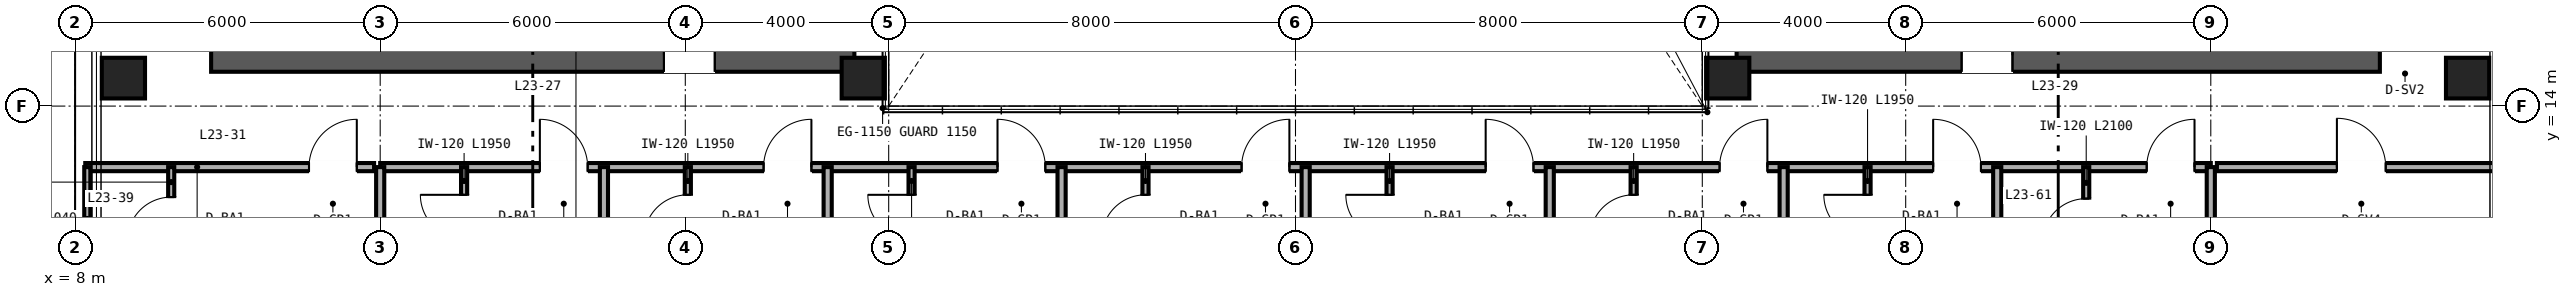
"""IFC4 building model, lengths in metres.
Left out: names, types, materials, properties, quantities, classifications, styles, units other than length and angle.
Written with IfcOpenShell. Run it as: python <this file> out.ifc"""

import sys

from ifc_helpers import new_model, si_unit, direction, frame, frame_2d, origin, origin_2d, place, context, subcontext, project, spatial, rectangle, hollow_rectangle, extrude, source, transform, mapped, element, fill, save


model = new_model("IFC4")
c1 = context("Model", 3, precision=1e-05, world=origin(), true_north=direction((0.0, 1.0)))
c2 = subcontext(c1, "Body", "Model", "MODEL_VIEW")
j1 = project(units=[si_unit("LENGTHUNIT", "METRE"), si_unit("PLANEANGLEUNIT", "RADIAN")], contexts=[c1])
p1 = place(None, origin())
s1 = spatial("IfcSite", under=j1, at=p1, CompositionType="ELEMENT")
p2 = place(p1, origin())
s2 = spatial("IfcBuilding", under=s1, at=p2, CompositionType="ELEMENT")
p3 = place(p2, frame((0.0, 0.0, 97.2)))
s3 = spatial("IfcBuildingStorey", under=s2, at=p3, CompositionType="ELEMENT", Elevation=97.2)
p4 = place(p3, frame((10.675, 15.0, 0.0), z_axis=(0.0, 0.0, 1.0), x_axis=(1.0, 0.0, 0.0)))
e1 = element("IfcWall", 1, at=p4, inside=s3, PredefinedType="SHEAR", context=c2, shape_type="SweptSolid", body=[
    extrude(rectangle(XDim=12.65, YDim=0.65, at=frame_2d((6.325, 0.0))), origin(), (0.0, 0.0, 1.0), 3.36),
])
p5 = place(p4, frame((8.905, 0.0, 0.0)))
e2 = element("IfcOpeningElement", 2, at=p5, cuts=e1, PredefinedType="OPENING", context=c2, shape_type="SweptSolid", body=[
    extrude(rectangle(XDim=1.0, YDim=2.15, at=frame_2d((0.5, 1.075))), frame((0.0, 0.335, 0.0), z_axis=(0.0, -1.0, 0.0), x_axis=(1.0, 0.0, 0.0)), (0.0, 0.0, 1.0), 0.67),
])
p6 = place(p3, frame((40.675, 15.0, 0.0), z_axis=(0.0, 0.0, 1.0), x_axis=(1.0, 0.0, 0.0)))
e3 = element("IfcWall", 3, at=p6, inside=s3, PredefinedType="SHEAR", context=c2, shape_type="SweptSolid", body=[
    extrude(rectangle(XDim=12.65, YDim=0.65, at=frame_2d((6.325, 0.0))), origin(), (0.0, 0.0, 1.0), 3.36),
])
p7 = place(p6, frame((4.425, 0.0, 0.0)))
e4 = element("IfcOpeningElement", 4, at=p7, cuts=e3, PredefinedType="OPENING", context=c2, shape_type="SweptSolid", body=[
    extrude(rectangle(XDim=1.0, YDim=2.15, at=frame_2d((0.5, 1.075))), frame((0.0, 0.335, 0.0), z_axis=(0.0, -1.0, 0.0), x_axis=(1.0, 0.0, 0.0)), (0.0, 0.0, 1.0), 0.67),
])
m1 = source(origin(), c2, "Body", "SweptSolid", [
    extrude(hollow_rectangle(XDim=0.85, YDim=0.8, WallThickness=0.032, at=origin_2d()), origin(), (0.0, 0.0, 1.0), 3.36),
])
for number, where, z_axis, x_axis in (
    (5, (8.95, 14.55, 0.0), (0.0, 0.0, 1.0), (1.0, 0.0, 0.0)),
    (6, (23.5, 14.55, 0.0), (0.0, 0.0, 1.0), (1.0, 0.0, 0.0)),
    (7, (40.5, 14.55, 0.0), (0.0, 0.0, 1.0), (1.0, 0.0, 0.0)),
    (8, (55.05, 14.55, 0.0), (0.0, 0.0, 1.0), (1.0, 0.0, 0.0)),
):
    element("IfcColumn", number, at=place(p3, frame(where, z_axis=z_axis, x_axis=x_axis)), inside=s3, PredefinedType="COLUMN", context=c2, shape_type="MappedRepresentation", body=[
        mapped(m1, transform((0.0, 0.0, 0.0), scale=1.0)),
    ])
p8 = place(p3, frame((8.2, 12.8, 0.0), z_axis=(0.0, 0.0, 1.0), x_axis=(1.0, 0.0, 0.0)))
e9 = element("IfcWall", 9, at=p8, inside=s3, PredefinedType="PARTITIONING", context=c2, shape_type="SweptSolid", body=[
    extrude(rectangle(XDim=5.68, YDim=0.16, at=frame_2d((2.84, 0.0))), origin(), (0.0, 0.0, 1.0), 3.36),
])
p9 = place(p8, frame((4.4, 0.0, 0.0)))
e10 = element("IfcOpeningElement", 10, at=p9, cuts=e9, PredefinedType="OPENING", context=c2, shape_type="SweptSolid", body=[
    extrude(rectangle(XDim=0.94, YDim=2.15, at=frame_2d((0.47, 1.075))), frame((0.0, 0.09, 0.0), z_axis=(0.0, -1.0, 0.0), x_axis=(1.0, 0.0, 0.0)), (0.0, 0.0, 1.0), 0.18),
])
p10 = place(p3, frame((9.89, 10.76, 0.0), z_axis=(0.0, 0.0, 1.0), x_axis=(0.0, 1.0, 0.0)))
e11 = element("IfcWall", 11, at=p10, inside=s3, PredefinedType="PARTITIONING", context=c2, shape_type="SweptSolid", body=[
    extrude(rectangle(XDim=2.04, YDim=0.12, at=frame_2d((1.02, 0.0))), origin(), (0.0, 0.0, 1.0), 3.36),
])
p11 = place(p10, frame((0.59, 0.0, 0.0)))
e12 = element("IfcOpeningElement", 12, at=p11, cuts=e11, PredefinedType="OPENING", context=c2, shape_type="SweptSolid", body=[
    extrude(rectangle(XDim=0.86, YDim=2.1, at=frame_2d((0.43, 1.05))), frame((0.0, 0.07, 0.0), z_axis=(0.0, -1.0, 0.0), x_axis=(1.0, 0.0, 0.0)), (0.0, 0.0, 1.0), 0.14),
])
p12 = place(p3, frame((8.24, 10.76, 0.0), z_axis=(0.0, 0.0, 1.0), x_axis=(0.0, 1.0, 0.0)))
e13 = element("IfcWall", 13, at=p12, inside=s3, PredefinedType="PARTITIONING", context=c2, shape_type="SweptSolid", body=[
    extrude(rectangle(XDim=2.04, YDim=0.12, at=frame_2d((1.02, 0.0))), origin(), (0.0, 0.0, 1.0), 3.36),
])
p13 = place(p3, frame((50.12, 12.8, 0.0), z_axis=(0.0, 0.0, 1.0), x_axis=(1.0, 0.0, 0.0)))
e14 = element("IfcWall", 14, at=p13, inside=s3, PredefinedType="PARTITIONING", context=c2, shape_type="SweptSolid", body=[
    extrude(rectangle(XDim=5.68, YDim=0.16, at=frame_2d((2.84, 0.0))), origin(), (0.0, 0.0, 1.0), 3.36),
])
p14 = place(p13, frame((2.36, 0.0, 0.0)))
e15 = element("IfcOpeningElement", 15, at=p14, cuts=e14, PredefinedType="OPENING", context=c2, shape_type="SweptSolid", body=[
    extrude(rectangle(XDim=0.96, YDim=2.15, at=frame_2d((0.48, 1.075))), frame((0.0, 0.09, 0.0), z_axis=(0.0, -1.0, 0.0), x_axis=(1.0, 0.0, 0.0)), (0.0, 0.0, 1.0), 0.18),
])
p15 = place(p3, frame((14.0, 12.8, 0.0), z_axis=(0.0, 0.0, 1.0), x_axis=(1.0, 0.0, 0.0)))
e16 = element("IfcWall", 16, at=p15, inside=s3, PredefinedType="PARTITIONING", context=c2, shape_type="SweptSolid", body=[
    extrude(rectangle(XDim=36.0, YDim=0.16, at=frame_2d((18.0, 0.0))), origin(), (0.0, 0.0, 1.0), 2.581),
])
p16 = place(p15, frame((3.14, 0.0, 0.0)))
e17 = element("IfcOpeningElement", 17, at=p16, cuts=e16, PredefinedType="OPENING", context=c2, shape_type="SweptSolid", body=[
    extrude(rectangle(XDim=0.94, YDim=2.15, at=frame_2d((0.47, 1.075))), frame((0.0, 0.09, 0.0), z_axis=(0.0, -1.0, 0.0), x_axis=(1.0, 0.0, 0.0)), (0.0, 0.0, 1.0), 0.18),
])
p17 = place(p15, frame((7.54, 0.0, 0.0)))
e18 = element("IfcOpeningElement", 18, at=p17, cuts=e16, PredefinedType="OPENING", context=c2, shape_type="SweptSolid", body=[
    extrude(rectangle(XDim=0.94, YDim=2.15, at=frame_2d((0.47, 1.075))), frame((0.0, 0.09, 0.0), z_axis=(0.0, -1.0, 0.0), x_axis=(1.0, 0.0, 0.0)), (0.0, 0.0, 1.0), 0.18),
])
p18 = place(p15, frame((12.14, 0.0, 0.0)))
e19 = element("IfcOpeningElement", 19, at=p18, cuts=e16, PredefinedType="OPENING", context=c2, shape_type="SweptSolid", body=[
    extrude(rectangle(XDim=0.94, YDim=2.15, at=frame_2d((0.47, 1.075))), frame((0.0, 0.09, 0.0), z_axis=(0.0, -1.0, 0.0), x_axis=(1.0, 0.0, 0.0)), (0.0, 0.0, 1.0), 0.18),
])
p19 = place(p15, frame((16.94, 0.0, 0.0)))
e20 = element("IfcOpeningElement", 20, at=p19, cuts=e16, PredefinedType="OPENING", context=c2, shape_type="SweptSolid", body=[
    extrude(rectangle(XDim=0.94, YDim=2.15, at=frame_2d((0.47, 1.075))), frame((0.0, 0.09, 0.0), z_axis=(0.0, -1.0, 0.0), x_axis=(1.0, 0.0, 0.0)), (0.0, 0.0, 1.0), 0.18),
])
p20 = place(p15, frame((21.74, 0.0, 0.0)))
e21 = element("IfcOpeningElement", 21, at=p20, cuts=e16, PredefinedType="OPENING", context=c2, shape_type="SweptSolid", body=[
    extrude(rectangle(XDim=0.94, YDim=2.15, at=frame_2d((0.47, 1.075))), frame((0.0, 0.09, 0.0), z_axis=(0.0, -1.0, 0.0), x_axis=(1.0, 0.0, 0.0)), (0.0, 0.0, 1.0), 0.18),
])
p21 = place(p15, frame((26.34, 0.0, 0.0)))
e22 = element("IfcOpeningElement", 22, at=p21, cuts=e16, PredefinedType="OPENING", context=c2, shape_type="SweptSolid", body=[
    extrude(rectangle(XDim=0.94, YDim=2.15, at=frame_2d((0.47, 1.075))), frame((0.0, 0.09, 0.0), z_axis=(0.0, -1.0, 0.0), x_axis=(1.0, 0.0, 0.0)), (0.0, 0.0, 1.0), 0.18),
])
p22 = place(p15, frame((30.54, 0.0, 0.0)))
e23 = element("IfcOpeningElement", 23, at=p22, cuts=e16, PredefinedType="OPENING", context=c2, shape_type="SweptSolid", body=[
    extrude(rectangle(XDim=0.94, YDim=2.15, at=frame_2d((0.47, 1.075))), frame((0.0, 0.09, 0.0), z_axis=(0.0, -1.0, 0.0), x_axis=(1.0, 0.0, 0.0)), (0.0, 0.0, 1.0), 0.18),
])
p23 = place(p15, frame((34.74, 0.0, 0.0)))
e24 = element("IfcOpeningElement", 24, at=p23, cuts=e16, PredefinedType="OPENING", context=c2, shape_type="SweptSolid", body=[
    extrude(rectangle(XDim=0.94, YDim=2.15, at=frame_2d((0.47, 1.075))), frame((0.0, 0.09, 0.0), z_axis=(0.0, -1.0, 0.0), x_axis=(1.0, 0.0, 0.0)), (0.0, 0.0, 1.0), 0.18),
])
for number, where, z_axis, x_axis in (
    (25, (14.0, 2.36, 0.0), (0.0, 0.0, 1.0), (0.0, 1.0, 0.0)),
    (26, (50.0, 2.36, 0.0), (0.0, 0.0, 1.0), (0.0, 1.0, 0.0)),
    (27, (18.4, 2.36, 0.0), (0.0, 0.0, 1.0), (0.0, 1.0, 0.0)),
):
    element("IfcWall", number, at=place(p3, frame(where, z_axis=z_axis, x_axis=x_axis)), inside=s3, PredefinedType="PARTITIONING", context=c2, shape_type="SweptSolid", body=[
        extrude(rectangle(XDim=10.44, YDim=0.16, at=frame_2d((5.22, 0.0))), origin(), (0.0, 0.0, 1.0), 2.667),
    ])
p24 = place(p3, frame((15.65, 10.85, 0.0), z_axis=(0.0, 0.0, 1.0), x_axis=(0.0, 1.0, 0.0)))
e28 = element("IfcWall", 28, at=p24, inside=s3, PredefinedType="PARTITIONING", context=c2, shape_type="SweptSolid", body=[
    extrude(rectangle(XDim=1.95, YDim=0.12, at=frame_2d((0.975, 0.0))), origin(), (0.0, 0.0, 1.0), 3.36),
])
p25 = place(p24, frame((0.545, 0.0, 0.0)))
e29 = element("IfcOpeningElement", 29, at=p25, cuts=e28, PredefinedType="OPENING", context=c2, shape_type="SweptSolid", body=[
    extrude(rectangle(XDim=0.86, YDim=2.1, at=frame_2d((0.43, 1.05))), frame((0.0, 0.07, 0.0), z_axis=(0.0, -1.0, 0.0), x_axis=(1.0, 0.0, 0.0)), (0.0, 0.0, 1.0), 0.14),
])
p26 = place(p3, frame((22.8, 2.36, 0.0), z_axis=(0.0, 0.0, 1.0), x_axis=(0.0, 1.0, 0.0)))
e30 = element("IfcWall", 30, at=p26, inside=s3, PredefinedType="PARTITIONING", context=c2, shape_type="SweptSolid", body=[
    extrude(rectangle(XDim=10.44, YDim=0.16, at=frame_2d((5.22, 0.0))), origin(), (0.0, 0.0, 1.0), 2.823),
])
p27 = place(p3, frame((20.05, 10.85, 0.0), z_axis=(0.0, 0.0, 1.0), x_axis=(0.0, 1.0, 0.0)))
e31 = element("IfcWall", 31, at=p27, inside=s3, PredefinedType="PARTITIONING", context=c2, shape_type="SweptSolid", body=[
    extrude(rectangle(XDim=1.95, YDim=0.12, at=frame_2d((0.975, 0.0))), origin(), (0.0, 0.0, 1.0), 3.36),
])
p28 = place(p27, frame((0.545, 0.0, 0.0)))
e32 = element("IfcOpeningElement", 32, at=p28, cuts=e31, PredefinedType="OPENING", context=c2, shape_type="SweptSolid", body=[
    extrude(rectangle(XDim=0.86, YDim=2.1, at=frame_2d((0.43, 1.05))), frame((0.0, 0.07, 0.0), z_axis=(0.0, -1.0, 0.0), x_axis=(1.0, 0.0, 0.0)), (0.0, 0.0, 1.0), 0.14),
])
p29 = place(p3, frame((27.4, 2.36, 0.0), z_axis=(0.0, 0.0, 1.0), x_axis=(0.0, 1.0, 0.0)))
e33 = element("IfcWall", 33, at=p29, inside=s3, PredefinedType="PARTITIONING", context=c2, shape_type="SweptSolid", body=[
    extrude(rectangle(XDim=10.44, YDim=0.16, at=frame_2d((5.22, 0.0))), origin(), (0.0, 0.0, 1.0), 2.433),
])
p30 = place(p3, frame((24.45, 10.85, 0.0), z_axis=(0.0, 0.0, 1.0), x_axis=(0.0, 1.0, 0.0)))
e34 = element("IfcWall", 34, at=p30, inside=s3, PredefinedType="PARTITIONING", context=c2, shape_type="SweptSolid", body=[
    extrude(rectangle(XDim=1.95, YDim=0.12, at=frame_2d((0.975, 0.0))), origin(), (0.0, 0.0, 1.0), 3.36),
])
p31 = place(p30, frame((0.545, 0.0, 0.0)))
e35 = element("IfcOpeningElement", 35, at=p31, cuts=e34, PredefinedType="OPENING", context=c2, shape_type="SweptSolid", body=[
    extrude(rectangle(XDim=0.86, YDim=2.1, at=frame_2d((0.43, 1.05))), frame((0.0, 0.07, 0.0), z_axis=(0.0, -1.0, 0.0), x_axis=(1.0, 0.0, 0.0)), (0.0, 0.0, 1.0), 0.14),
])
p32 = place(p3, frame((32.2, 2.36, 0.0), z_axis=(0.0, 0.0, 1.0), x_axis=(0.0, 1.0, 0.0)))
e36 = element("IfcWall", 36, at=p32, inside=s3, PredefinedType="PARTITIONING", context=c2, shape_type="SweptSolid", body=[
    extrude(rectangle(XDim=10.44, YDim=0.16, at=frame_2d((5.22, 0.0))), origin(), (0.0, 0.0, 1.0), 2.433),
])
p33 = place(p3, frame((29.05, 10.85, 0.0), z_axis=(0.0, 0.0, 1.0), x_axis=(0.0, 1.0, 0.0)))
e37 = element("IfcWall", 37, at=p33, inside=s3, PredefinedType="PARTITIONING", context=c2, shape_type="SweptSolid", body=[
    extrude(rectangle(XDim=1.95, YDim=0.12, at=frame_2d((0.975, 0.0))), origin(), (0.0, 0.0, 1.0), 3.36),
])
p34 = place(p33, frame((0.545, 0.0, 0.0)))
e38 = element("IfcOpeningElement", 38, at=p34, cuts=e37, PredefinedType="OPENING", context=c2, shape_type="SweptSolid", body=[
    extrude(rectangle(XDim=0.86, YDim=2.1, at=frame_2d((0.43, 1.05))), frame((0.0, 0.07, 0.0), z_axis=(0.0, -1.0, 0.0), x_axis=(1.0, 0.0, 0.0)), (0.0, 0.0, 1.0), 0.14),
])
p35 = place(p3, frame((37.0, 2.36, 0.0), z_axis=(0.0, 0.0, 1.0), x_axis=(0.0, 1.0, 0.0)))
e39 = element("IfcWall", 39, at=p35, inside=s3, PredefinedType="PARTITIONING", context=c2, shape_type="SweptSolid", body=[
    extrude(rectangle(XDim=10.44, YDim=0.16, at=frame_2d((5.22, 0.0))), origin(), (0.0, 0.0, 1.0), 2.433),
])
p36 = place(p3, frame((33.85, 10.85, 0.0), z_axis=(0.0, 0.0, 1.0), x_axis=(0.0, 1.0, 0.0)))
e40 = element("IfcWall", 40, at=p36, inside=s3, PredefinedType="PARTITIONING", context=c2, shape_type="SweptSolid", body=[
    extrude(rectangle(XDim=1.95, YDim=0.12, at=frame_2d((0.975, 0.0))), origin(), (0.0, 0.0, 1.0), 3.36),
])
p37 = place(p36, frame((0.545, 0.0, 0.0)))
e41 = element("IfcOpeningElement", 41, at=p37, cuts=e40, PredefinedType="OPENING", context=c2, shape_type="SweptSolid", body=[
    extrude(rectangle(XDim=0.86, YDim=2.1, at=frame_2d((0.43, 1.05))), frame((0.0, 0.07, 0.0), z_axis=(0.0, -1.0, 0.0), x_axis=(1.0, 0.0, 0.0)), (0.0, 0.0, 1.0), 0.14),
])
p38 = place(p3, frame((41.6, 2.36, 0.0), z_axis=(0.0, 0.0, 1.0), x_axis=(0.0, 1.0, 0.0)))
e42 = element("IfcWall", 42, at=p38, inside=s3, PredefinedType="PARTITIONING", context=c2, shape_type="SweptSolid", body=[
    extrude(rectangle(XDim=10.44, YDim=0.16, at=frame_2d((5.22, 0.0))), origin(), (0.0, 0.0, 1.0), 2.823),
])
p39 = place(p3, frame((38.65, 10.85, 0.0), z_axis=(0.0, 0.0, 1.0), x_axis=(0.0, 1.0, 0.0)))
e43 = element("IfcWall", 43, at=p39, inside=s3, PredefinedType="PARTITIONING", context=c2, shape_type="SweptSolid", body=[
    extrude(rectangle(XDim=1.95, YDim=0.12, at=frame_2d((0.975, 0.0))), origin(), (0.0, 0.0, 1.0), 3.36),
])
p40 = place(p39, frame((0.545, 0.0, 0.0)))
e44 = element("IfcOpeningElement", 44, at=p40, cuts=e43, PredefinedType="OPENING", context=c2, shape_type="SweptSolid", body=[
    extrude(rectangle(XDim=0.86, YDim=2.1, at=frame_2d((0.43, 1.05))), frame((0.0, 0.07, 0.0), z_axis=(0.0, -1.0, 0.0), x_axis=(1.0, 0.0, 0.0)), (0.0, 0.0, 1.0), 0.14),
])
p41 = place(p3, frame((45.8, 2.36, 0.0), z_axis=(0.0, 0.0, 1.0), x_axis=(0.0, 1.0, 0.0)))
e45 = element("IfcWall", 45, at=p41, inside=s3, PredefinedType="PARTITIONING", context=c2, shape_type="SweptSolid", body=[
    extrude(rectangle(XDim=10.44, YDim=0.16, at=frame_2d((5.22, 0.0))), origin(), (0.0, 0.0, 1.0), 2.667),
])
p42 = place(p3, frame((43.25, 10.85, 0.0), z_axis=(0.0, 0.0, 1.0), x_axis=(0.0, 1.0, 0.0)))
e46 = element("IfcWall", 46, at=p42, inside=s3, PredefinedType="PARTITIONING", context=c2, shape_type="SweptSolid", body=[
    extrude(rectangle(XDim=1.95, YDim=0.12, at=frame_2d((0.975, 0.0))), origin(), (0.0, 0.0, 1.0), 3.36),
])
p43 = place(p42, frame((0.545, 0.0, 0.0)))
e47 = element("IfcOpeningElement", 47, at=p43, cuts=e46, PredefinedType="OPENING", context=c2, shape_type="SweptSolid", body=[
    extrude(rectangle(XDim=0.86, YDim=2.1, at=frame_2d((0.43, 1.05))), frame((0.0, 0.07, 0.0), z_axis=(0.0, -1.0, 0.0), x_axis=(1.0, 0.0, 0.0)), (0.0, 0.0, 1.0), 0.14),
])
p44 = place(p3, frame((47.55, 10.7, 0.0), z_axis=(0.0, 0.0, 1.0), x_axis=(0.0, 1.0, 0.0)))
e48 = element("IfcWall", 48, at=p44, inside=s3, PredefinedType="PARTITIONING", context=c2, shape_type="SweptSolid", body=[
    extrude(rectangle(XDim=2.1, YDim=0.12, at=frame_2d((1.05, 0.0))), origin(), (0.0, 0.0, 1.0), 3.36),
])
p45 = place(p44, frame((0.62, 0.0, 0.0)))
e49 = element("IfcOpeningElement", 49, at=p45, cuts=e48, PredefinedType="OPENING", context=c2, shape_type="SweptSolid", body=[
    extrude(rectangle(XDim=0.86, YDim=2.1, at=frame_2d((0.43, 1.05))), frame((0.0, 0.07, 0.0), z_axis=(0.0, -1.0, 0.0), x_axis=(1.0, 0.0, 0.0)), (0.0, 0.0, 1.0), 0.14),
])
m2 = source(origin(), c2, "Body", "SweptSolid", [
    extrude(rectangle(XDim=1.0, YDim=2.15, at=frame_2d((0.5, 1.075))), frame((0.0, 0.025, 0.0), z_axis=(0.0, -1.0, 0.0), x_axis=(1.0, 0.0, 0.0)), (0.0, 0.0, 1.0), 0.05),
])
p46 = place(p5, origin())
e50 = element("IfcDoor", 50, at=p46, inside=s3, OperationType="SINGLE_SWING_LEFT", PredefinedType="DOOR", context=c2, shape_type="MappedRepresentation", body=[
    mapped(m2, transform((0.0, 0.0, 0.0), scale=1.0)),
])
fill(e2, e50)
p47 = place(p7, origin())
e51 = element("IfcDoor", 51, at=p47, inside=s3, OperationType="SINGLE_SWING_RIGHT", PredefinedType="DOOR", context=c2, shape_type="MappedRepresentation", body=[
    mapped(m2, transform((0.0, 0.0, 0.0), scale=1.0)),
])
fill(e4, e51)
m3 = source(origin(), c2, "Body", "SweptSolid", [
    extrude(rectangle(XDim=0.86, YDim=2.1, at=frame_2d((0.43, 1.05))), frame((0.0, 0.025, 0.0), z_axis=(0.0, -1.0, 0.0), x_axis=(1.0, 0.0, 0.0)), (0.0, 0.0, 1.0), 0.05),
])
p48 = place(p11, origin())
e52 = element("IfcDoor", 52, at=p48, inside=s3, OperationType="SINGLE_SWING_LEFT", PredefinedType="DOOR", context=c2, shape_type="MappedRepresentation", body=[
    mapped(m3, transform((0.0, 0.0, 0.0), scale=1.0)),
])
fill(e12, e52)
m4 = source(origin(), c2, "Body", "SweptSolid", [
    extrude(rectangle(XDim=0.94, YDim=2.15, at=frame_2d((0.47, 1.075))), frame((0.0, 0.025, 0.0), z_axis=(0.0, -1.0, 0.0), x_axis=(1.0, 0.0, 0.0)), (0.0, 0.0, 1.0), 0.05),
])
p49 = place(p9, origin())
e53 = element("IfcDoor", 53, at=p49, inside=s3, OperationType="SINGLE_SWING_RIGHT", PredefinedType="DOOR", context=c2, shape_type="MappedRepresentation", body=[
    mapped(m4, transform((0.0, 0.0, 0.0), scale=1.0)),
])
fill(e10, e53)
m5 = source(origin(), c2, "Body", "SweptSolid", [
    extrude(rectangle(XDim=0.96, YDim=2.15, at=frame_2d((0.48, 1.075))), frame((0.0, 0.025, 0.0), z_axis=(0.0, -1.0, 0.0), x_axis=(1.0, 0.0, 0.0)), (0.0, 0.0, 1.0), 0.05),
])
p50 = place(p14, origin())
e54 = element("IfcDoor", 54, at=p50, inside=s3, OperationType="SINGLE_SWING_LEFT", PredefinedType="DOOR", context=c2, shape_type="MappedRepresentation", body=[
    mapped(m5, transform((0.0, 0.0, 0.0), scale=1.0)),
])
fill(e15, e54)
p51 = place(p25, origin())
e55 = element("IfcDoor", 55, at=p51, inside=s3, OperationType="SINGLE_SWING_RIGHT", PredefinedType="DOOR", context=c2, shape_type="MappedRepresentation", body=[
    mapped(m3, transform((0.0, 0.0, 0.0), scale=1.0)),
])
fill(e29, e55)
p52 = place(p28, origin())
e56 = element("IfcDoor", 56, at=p52, inside=s3, OperationType="SINGLE_SWING_LEFT", PredefinedType="DOOR", context=c2, shape_type="MappedRepresentation", body=[
    mapped(m3, transform((0.0, 0.0, 0.0), scale=1.0)),
])
fill(e32, e56)
p53 = place(p31, origin())
e57 = element("IfcDoor", 57, at=p53, inside=s3, OperationType="SINGLE_SWING_RIGHT", PredefinedType="DOOR", context=c2, shape_type="MappedRepresentation", body=[
    mapped(m3, transform((0.0, 0.0, 0.0), scale=1.0)),
])
fill(e35, e57)
p54 = place(p34, origin())
e58 = element("IfcDoor", 58, at=p54, inside=s3, OperationType="SINGLE_SWING_LEFT", PredefinedType="DOOR", context=c2, shape_type="MappedRepresentation", body=[
    mapped(m3, transform((0.0, 0.0, 0.0), scale=1.0)),
])
fill(e38, e58)
p55 = place(p37, origin())
e59 = element("IfcDoor", 59, at=p55, inside=s3, OperationType="SINGLE_SWING_RIGHT", PredefinedType="DOOR", context=c2, shape_type="MappedRepresentation", body=[
    mapped(m3, transform((0.0, 0.0, 0.0), scale=1.0)),
])
fill(e41, e59)
p56 = place(p40, origin())
e60 = element("IfcDoor", 60, at=p56, inside=s3, OperationType="SINGLE_SWING_LEFT", PredefinedType="DOOR", context=c2, shape_type="MappedRepresentation", body=[
    mapped(m3, transform((0.0, 0.0, 0.0), scale=1.0)),
])
fill(e44, e60)
p57 = place(p43, origin())
e61 = element("IfcDoor", 61, at=p57, inside=s3, OperationType="SINGLE_SWING_RIGHT", PredefinedType="DOOR", context=c2, shape_type="MappedRepresentation", body=[
    mapped(m3, transform((0.0, 0.0, 0.0), scale=1.0)),
])
fill(e47, e61)
p58 = place(p45, origin())
e62 = element("IfcDoor", 62, at=p58, inside=s3, OperationType="SINGLE_SWING_LEFT", PredefinedType="DOOR", context=c2, shape_type="MappedRepresentation", body=[
    mapped(m3, transform((0.0, 0.0, 0.0), scale=1.0)),
])
fill(e49, e62)
p59 = place(p16, origin())
e63 = element("IfcDoor", 63, at=p59, inside=s3, OperationType="SINGLE_SWING_LEFT", PredefinedType="DOOR", context=c2, shape_type="MappedRepresentation", body=[
    mapped(m4, transform((0.0, 0.0, 0.0), scale=1.0)),
])
fill(e17, e63)
p60 = place(p17, origin())
e64 = element("IfcDoor", 64, at=p60, inside=s3, OperationType="SINGLE_SWING_RIGHT", PredefinedType="DOOR", context=c2, shape_type="MappedRepresentation", body=[
    mapped(m4, transform((0.0, 0.0, 0.0), scale=1.0)),
])
fill(e18, e64)
p61 = place(p18, origin())
e65 = element("IfcDoor", 65, at=p61, inside=s3, OperationType="SINGLE_SWING_LEFT", PredefinedType="DOOR", context=c2, shape_type="MappedRepresentation", body=[
    mapped(m4, transform((0.0, 0.0, 0.0), scale=1.0)),
])
fill(e19, e65)
p62 = place(p19, origin())
e66 = element("IfcDoor", 66, at=p62, inside=s3, OperationType="SINGLE_SWING_RIGHT", PredefinedType="DOOR", context=c2, shape_type="MappedRepresentation", body=[
    mapped(m4, transform((0.0, 0.0, 0.0), scale=1.0)),
])
fill(e20, e66)
p63 = place(p20, origin())
e67 = element("IfcDoor", 67, at=p63, inside=s3, OperationType="SINGLE_SWING_LEFT", PredefinedType="DOOR", context=c2, shape_type="MappedRepresentation", body=[
    mapped(m4, transform((0.0, 0.0, 0.0), scale=1.0)),
])
fill(e21, e67)
p64 = place(p21, origin())
e68 = element("IfcDoor", 68, at=p64, inside=s3, OperationType="SINGLE_SWING_RIGHT", PredefinedType="DOOR", context=c2, shape_type="MappedRepresentation", body=[
    mapped(m4, transform((0.0, 0.0, 0.0), scale=1.0)),
])
fill(e22, e68)
p65 = place(p22, origin())
e69 = element("IfcDoor", 69, at=p65, inside=s3, OperationType="SINGLE_SWING_LEFT", PredefinedType="DOOR", context=c2, shape_type="MappedRepresentation", body=[
    mapped(m4, transform((0.0, 0.0, 0.0), scale=1.0)),
])
fill(e23, e69)
p66 = place(p23, origin())
e70 = element("IfcDoor", 70, at=p66, inside=s3, OperationType="SINGLE_SWING_RIGHT", PredefinedType="DOOR", context=c2, shape_type="MappedRepresentation", body=[
    mapped(m4, transform((0.0, 0.0, 0.0), scale=1.0)),
])
fill(e24, e70)
save(model, sys.argv[1])
